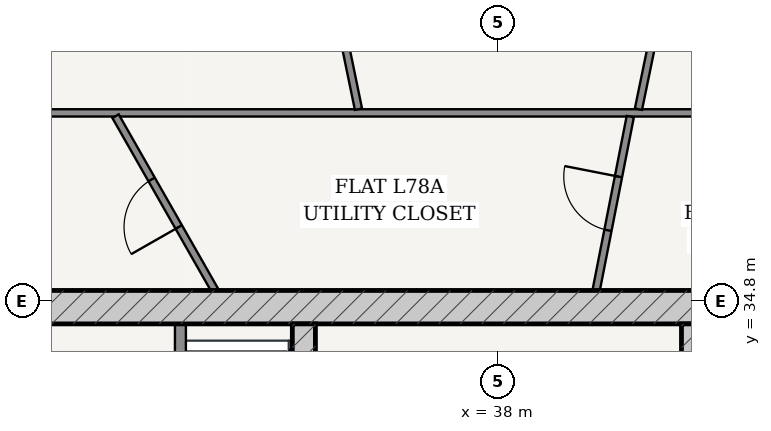
"""IFC4 building model, lengths in metres.
Left out: names, types, materials, properties, quantities, classifications, styles, units other than length and angle.
Written with IfcOpenShell. Run it as: python <this file> out.ifc"""

import sys

from ifc_helpers import new_model, si_unit, direction, frame, frame_2d, origin, place, context, subcontext, project, spatial, rectangle, extrude, source, transform, mapped, element, fill, save


model = new_model("IFC4")
c1 = context("Model", 3, precision=1e-05, world=origin(), true_north=direction((-0.2419218956, 0.970295726276)))
c2 = subcontext(c1, "Body", "Model", "MODEL_VIEW")
j1 = project(units=[si_unit("LENGTHUNIT", "METRE"), si_unit("PLANEANGLEUNIT", "RADIAN")], contexts=[c1])
p1 = place(None, origin())
s1 = spatial("IfcSite", under=j1, at=p1, CompositionType="ELEMENT")
p2 = place(p1, origin())
s2 = spatial("IfcBuilding", under=s1, at=p2, CompositionType="ELEMENT")
p3 = place(p2, frame((0.0, 0.0, 296.95)))
s3 = spatial("IfcBuildingStorey", under=s2, at=p3, CompositionType="ELEMENT", Elevation=296.95)
p4 = place(p3, frame((28.825, 34.7, 0.0), z_axis=(0.0, 0.0, 1.0), x_axis=(1.0, 0.0, 0.0)))
e1 = element("IfcWall", 1, at=p4, inside=s3, PredefinedType="SHEAR", context=c2, shape_type="SweptSolid", body=[
    extrude(rectangle(XDim=18.35, YDim=0.55, at=frame_2d((9.175, 0.0))), origin(), (0.0, 0.0, 1.0), 3.3),
])
p5 = place(p3, frame((34.8, 19.175, 0.0), z_axis=(0.0, 0.0, 1.0), x_axis=(0.0, 1.0, 0.0)))
e2 = element("IfcWall", 2, at=p5, inside=s3, PredefinedType="SHEAR", context=c2, shape_type="SweptSolid", body=[
    extrude(rectangle(XDim=15.25, YDim=0.38, at=frame_2d((7.625, 0.0))), origin(), (0.0, 0.0, 1.0), 3.3),
])
p6 = place(p5, frame((7.8, 0.0, 0.0)))
e3 = element("IfcOpeningElement", 3, at=p6, cuts=e2, PredefinedType="OPENING", context=c2, shape_type="SweptSolid", body=[
    extrude(rectangle(XDim=1.05, YDim=2.15, at=frame_2d((0.525, 1.075))), frame((0.0, 0.2, 0.0), z_axis=(0.0, -1.0, 0.0), x_axis=(1.0, 0.0, 0.0)), (0.0, 0.0, 1.0), 0.4),
])
p7 = place(p3, frame((41.2, 19.175, 0.0), z_axis=(0.0, 0.0, 1.0), x_axis=(0.0, 1.0, 0.0)))
e4 = element("IfcWall", 4, at=p7, inside=s3, PredefinedType="SHEAR", context=c2, shape_type="SweptSolid", body=[
    extrude(rectangle(XDim=15.25, YDim=0.38, at=frame_2d((7.625, 0.0))), origin(), (0.0, 0.0, 1.0), 3.3),
])
p8 = place(p7, frame((7.8, 0.0, 0.0)))
e5 = element("IfcOpeningElement", 5, at=p8, cuts=e4, PredefinedType="OPENING", context=c2, shape_type="SweptSolid", body=[
    extrude(rectangle(XDim=1.05, YDim=2.15, at=frame_2d((0.525, 1.075))), frame((0.0, 0.2, 0.0), z_axis=(0.0, -1.0, 0.0), x_axis=(1.0, 0.0, 0.0)), (0.0, 0.0, 1.0), 0.4),
])
p9 = place(p3, frame((32.77, 28.52, 0.0), z_axis=(0.0, 0.0, 1.0), x_axis=(0.0, 1.0, 0.0)))
e6 = element("IfcWall", 6, at=p9, inside=s3, PredefinedType="PARTITIONING", context=c2, shape_type="SweptSolid", body=[
    extrude(rectangle(XDim=5.905, YDim=0.18, at=frame_2d((2.953, 0.0))), origin(), (0.0, 0.0, 1.0), 3.3),
])
p10 = place(p9, frame((3.655, 0.0, 0.0)))
e7 = element("IfcOpeningElement", 7, at=p10, cuts=e6, PredefinedType="OPENING", context=c2, shape_type="SweptSolid", body=[
    extrude(rectangle(XDim=1.15, YDim=2.2, at=frame_2d((0.575, 1.1))), frame((0.0, 0.1, 0.0), z_axis=(0.0, -1.0, 0.0), x_axis=(1.0, 0.0, 0.0)), (0.0, 0.0, 1.0), 0.2),
])
p11 = place(p9, frame((0.73, 0.0, 0.0)))
e8 = element("IfcOpeningElement", 8, at=p11, cuts=e6, PredefinedType="OPENING", context=c2, shape_type="SweptSolid", body=[
    extrude(rectangle(XDim=1.2, YDim=2.25, at=frame_2d((0.6, 1.125))), frame((0.0, 0.1, 0.0), z_axis=(0.0, -1.0, 0.0), x_axis=(1.0, 0.0, 0.0)), (0.0, 0.0, 1.0), 0.2),
])
p12 = place(p3, frame((25.905, 37.895, 0.0), z_axis=(0.0, 0.0, 1.0), x_axis=(1.0, 0.0, 0.0)))
e9 = element("IfcWall", 9, at=p12, inside=s3, PredefinedType="PARTITIONING", context=c2, shape_type="SweptSolid", body=[
    extrude(rectangle(XDim=24.19, YDim=0.12, at=frame_2d((12.095, 0.0))), origin(), (0.0, 0.0, 1.0), 2.825),
])
p13 = place(p12, frame((21.621, 0.0, 0.0)))
e10 = element("IfcOpeningElement", 10, at=p13, cuts=e9, PredefinedType="OPENING", context=c2, shape_type="SweptSolid", body=[
    extrude(rectangle(XDim=0.9, YDim=2.15, at=frame_2d((0.45, 1.075))), frame((0.0, 0.07, 0.0), z_axis=(0.0, -1.0, 0.0), x_axis=(1.0, 0.0, 0.0)), (0.0, 0.0, 1.0), 0.14),
])
p14 = place(p12, frame((16.661, 0.0, 0.0)))
e11 = element("IfcOpeningElement", 11, at=p14, cuts=e9, PredefinedType="OPENING", context=c2, shape_type="SweptSolid", body=[
    extrude(rectangle(XDim=0.9, YDim=2.15, at=frame_2d((0.45, 1.075))), frame((0.0, 0.07, 0.0), z_axis=(0.0, -1.0, 0.0), x_axis=(1.0, 0.0, 0.0)), (0.0, 0.0, 1.0), 0.14),
])
p15 = place(p12, frame((1.872, 0.0, 0.0)))
e12 = element("IfcOpeningElement", 12, at=p15, cuts=e9, PredefinedType="OPENING", context=c2, shape_type="SweptSolid", body=[
    extrude(rectangle(XDim=0.9, YDim=2.15, at=frame_2d((0.45, 1.075))), frame((0.0, 0.07, 0.0), z_axis=(0.0, -1.0, 0.0), x_axis=(1.0, 0.0, 0.0)), (0.0, 0.0, 1.0), 0.14),
])
p16 = place(p3, frame((40.302, 37.956, 0.0), z_axis=(0.0, 0.0, 1.0), x_axis=(0.20211361456, 0.979362081566, 0.0)))
e13 = element("IfcWall", 13, at=p16, inside=s3, PredefinedType="PARTITIONING", context=c2, shape_type="SweptSolid", body=[
    extrude(rectangle(XDim=7.237, YDim=0.12, at=frame_2d((3.618, 0.0))), origin(), (0.0, 0.0, 1.0), 2.65),
])
p17 = place(p16, frame((2.154, 0.0, 0.0)))
e14 = element("IfcOpeningElement", 14, at=p17, cuts=e13, PredefinedType="OPENING", context=c2, shape_type="SweptSolid", body=[
    extrude(rectangle(XDim=0.9, YDim=2.15, at=frame_2d((0.45, 1.075))), frame((0.0, 0.07, 0.0), z_axis=(0.0, -1.0, 0.0), x_axis=(1.0, 0.0, 0.0)), (0.0, 0.0, 1.0), 0.14),
])
p18 = place(p3, frame((35.698, 37.956, 0.0), z_axis=(0.0, 0.0, 1.0), x_axis=(-0.20211361456, 0.979362081566, 0.0)))
e15 = element("IfcWall", 15, at=p18, inside=s3, PredefinedType="PARTITIONING", context=c2, shape_type="SweptSolid", body=[
    extrude(rectangle(XDim=7.237, YDim=0.12, at=frame_2d((3.618, 0.0))), origin(), (0.0, 0.0, 1.0), 2.65),
])
p19 = place(p18, frame((2.153, 0.0, 0.0)))
e16 = element("IfcOpeningElement", 16, at=p19, cuts=e15, PredefinedType="OPENING", context=c2, shape_type="SweptSolid", body=[
    extrude(rectangle(XDim=0.9, YDim=2.15, at=frame_2d((0.45, 1.075))), frame((0.0, 0.07, 0.0), z_axis=(0.0, -1.0, 0.0), x_axis=(1.0, 0.0, 0.0)), (0.0, 0.0, 1.0), 0.14),
])
p20 = place(p3, frame((39.607, 34.977, 0.0), z_axis=(0.0, 0.0, 1.0), x_axis=(0.192841890083, 0.981229843324, 0.0)))
e17 = element("IfcWall", 17, at=p20, inside=s3, PredefinedType="PARTITIONING", context=c2, shape_type="SweptSolid", body=[
    extrude(rectangle(XDim=2.912, YDim=0.12, at=frame_2d((1.456, 0.0))), origin(), (0.0, 0.0, 1.0), 2.385),
])
p21 = place(p20, frame((1.006, 0.0, 0.0)))
e18 = element("IfcOpeningElement", 18, at=p21, cuts=e17, PredefinedType="OPENING", context=c2, shape_type="SweptSolid", body=[
    extrude(rectangle(XDim=0.9, YDim=2.15, at=frame_2d((0.45, 1.075))), frame((0.0, 0.07, 0.0), z_axis=(0.0, -1.0, 0.0), x_axis=(1.0, 0.0, 0.0)), (0.0, 0.0, 1.0), 0.14),
])
p22 = place(p3, frame((33.336, 34.977, 0.0), z_axis=(0.0, 0.0, 1.0), x_axis=(-0.495413156231, 0.86865747256, 0.0)))
e19 = element("IfcWall", 19, at=p22, inside=s3, PredefinedType="PARTITIONING", context=c2, shape_type="SweptSolid", body=[
    extrude(rectangle(XDim=3.297, YDim=0.12, at=frame_2d((1.649, 0.0))), origin(), (0.0, 0.0, 1.0), 3.3),
])
p23 = place(p22, frame((1.199, 0.0, 0.0)))
e20 = element("IfcOpeningElement", 20, at=p23, cuts=e19, PredefinedType="OPENING", context=c2, shape_type="SweptSolid", body=[
    extrude(rectangle(XDim=0.9, YDim=2.15, at=frame_2d((0.45, 1.075))), frame((0.0, 0.07, 0.0), z_axis=(0.0, -1.0, 0.0), x_axis=(1.0, 0.0, 0.0)), (0.0, 0.0, 1.0), 0.14),
])
m1 = source(origin(), c2, "Body", "SweptSolid", [
    extrude(rectangle(XDim=0.9, YDim=2.15, at=frame_2d((0.45, 1.075))), frame((0.0, 0.025, 0.0), z_axis=(0.0, -1.0, 0.0), x_axis=(1.0, 0.0, 0.0)), (0.0, 0.0, 1.0), 0.05),
])
p24 = place(p21, origin())
e21 = element("IfcDoor", 21, at=p24, inside=s3, OperationType="SINGLE_SWING_RIGHT", PredefinedType="DOOR", context=c2, shape_type="MappedRepresentation", body=[
    mapped(m1, transform((0.0, 0.0, 0.0), scale=1.0)),
])
fill(e18, e21)
p25 = place(p23, origin())
e22 = element("IfcDoor", 22, at=p25, inside=s3, OperationType="SINGLE_SWING_LEFT", PredefinedType="DOOR", context=c2, shape_type="MappedRepresentation", body=[
    mapped(m1, transform((0.0, 0.0, 0.0), scale=1.0)),
])
fill(e20, e22)
save(model, sys.argv[1])
